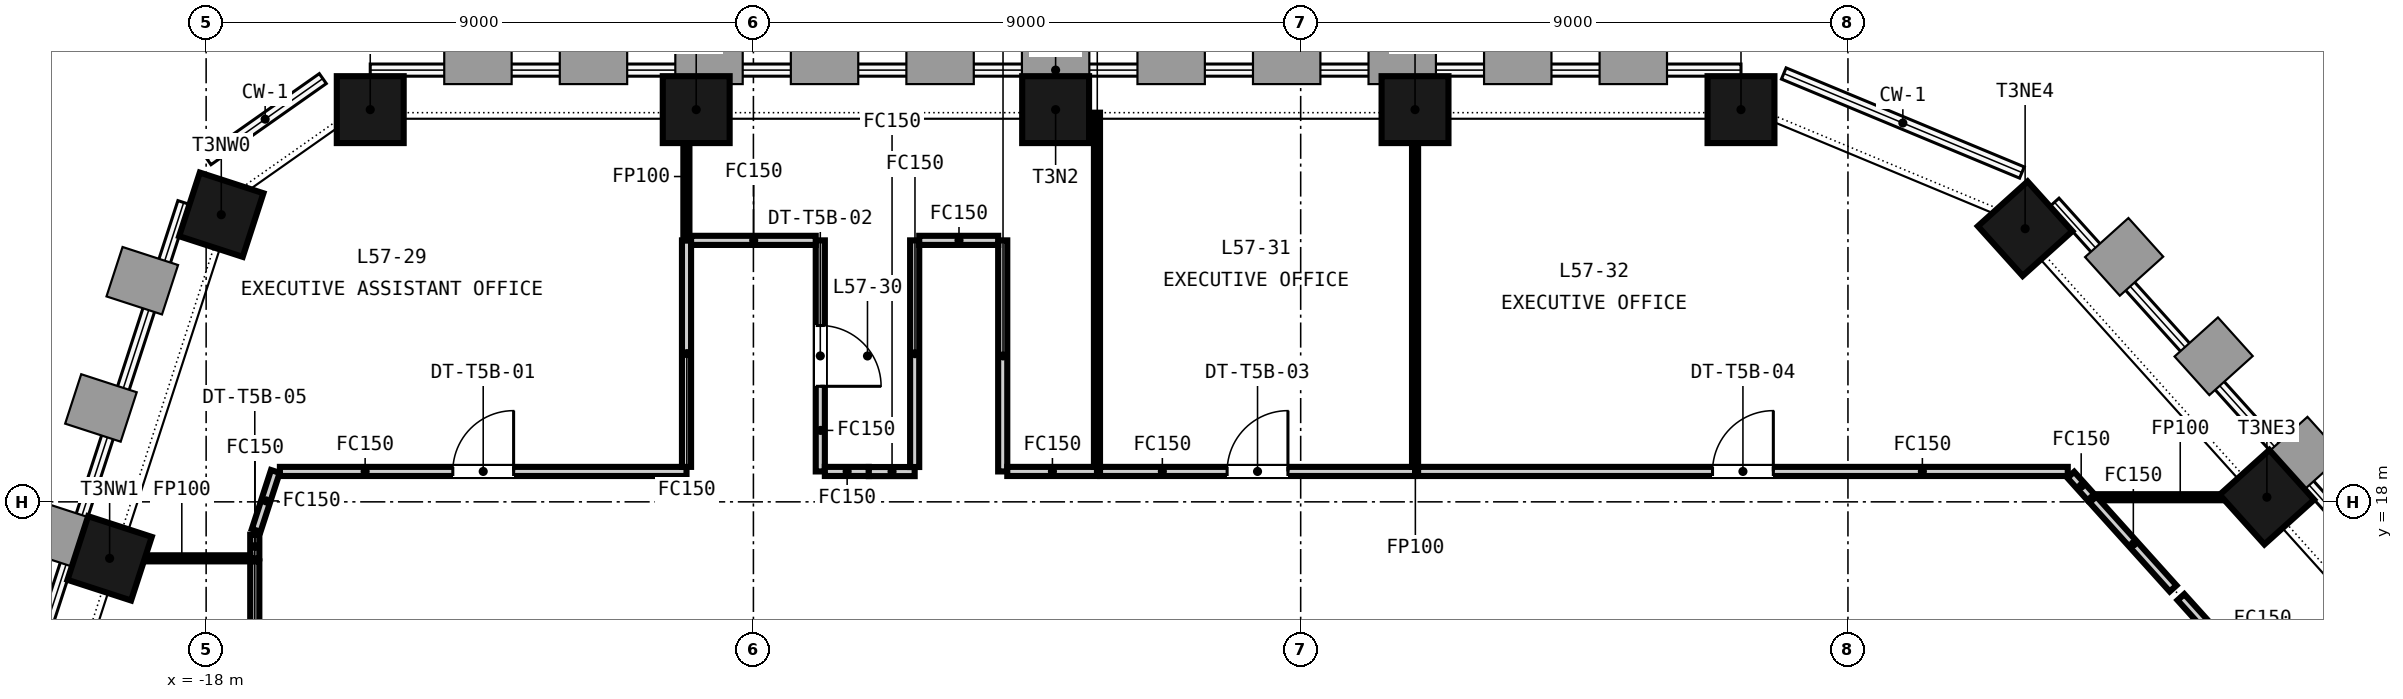
"""IFC4 building model, lengths in metres.
Left out: names, types, materials, properties, quantities, classifications, styles, units other than length and angle.
Written with IfcOpenShell. Run it as: python <this file> out.ifc"""

import sys

from ifc_helpers import new_model, si_unit, direction, frame, frame_2d, origin, origin_2d, place, context, subcontext, project, spatial, rectangle, extrude, element, fill, save


model = new_model("IFC4")
c1 = context("Model", 3, precision=1e-05, world=origin(), true_north=direction((0.0, 1.0)))
c2 = subcontext(c1, "Body", "Model", "MODEL_VIEW")
j1 = project(units=[si_unit("LENGTHUNIT", "METRE"), si_unit("PLANEANGLEUNIT", "RADIAN")], contexts=[c1])
p1 = place(None, origin())
s1 = spatial("IfcSite", under=j1, at=p1, CompositionType="ELEMENT")
p2 = place(p1, origin())
s2 = spatial("IfcBuilding", under=s1, at=p2, CompositionType="ELEMENT")
p3 = place(p2, frame((0.0, 0.0, 227.25)))
s3 = spatial("IfcBuildingStorey", under=s2, at=p3, CompositionType="ELEMENT", Elevation=227.25)
for number, where, z_axis, x_axis in (
    (1, (7.241, 24.45, -0.15), (0.0, 0.0, 1.0), (-1.0, 0.0, 0.0)),
    (2, (1.881, 24.45, -0.15), (0.0, 0.0, 1.0), (-1.0, 0.0, 0.0)),
    (3, (-4.03, 24.45, -0.15), (0.0, 0.0, 1.0), (-1.0, 0.0, 0.0)),
    (4, (-9.941, 24.45, -0.15), (0.0, 0.0, 1.0), (-1.0, 0.0, 0.0)),
    (5, (-15.301, 24.45, -0.15), (0.0, 0.0, 1.0), (-1.0, 0.0, 0.0)),
    (6, (-17.751, 22.722, -0.15), (0.0, 0.0, 1.0), (-0.309, -0.951, 0.0)),
    (7, (-19.587, 17.071, -0.15), (0.0, 0.0, 1.0), (-0.309, -0.951, 0.0)),
    (8, (15.89, 18.076, -0.15), (0.0, 0.0, 1.0), (-0.669, 0.743, 0.0)),
    (9, (11.914, 22.492, -0.15), (0.0, 0.0, 1.0), (-0.669, 0.743, 0.0)),
):
    element("IfcColumn", number, at=place(p3, frame(where, z_axis=z_axis, x_axis=x_axis)), inside=s3, PredefinedType="COLUMN", context=c2, shape_type="SweptSolid", body=[
        extrude(rectangle(XDim=1.1, YDim=1.1, at=origin_2d()), origin(), (0.0, 0.0, 1.0), 3.65),
    ])
p4 = place(p3, frame((-7.9, 22.3, 0.0), z_axis=(0.0, 0.0, 1.0), x_axis=(0.0, -1.0, 0.0)))
e10 = element("IfcWall", 10, at=p4, inside=s3, PredefinedType="PARTITIONING", context=c2, shape_type="SweptSolid", body=[
    extrude(rectangle(XDim=3.8, YDim=0.15, at=frame_2d((1.9, 0.0))), origin(), (0.0, 0.0, 1.0), 2.751),
])
p5 = place(p4, frame((1.4, 0.0, 0.0)))
e11 = element("IfcOpeningElement", 11, at=p5, cuts=e10, PredefinedType="OPENING", context=c2, shape_type="SweptSolid", body=[
    extrude(rectangle(XDim=1.0, YDim=2.1, at=frame_2d((0.5, 1.05))), frame((0.0, 0.085, 0.0), z_axis=(0.0, -1.0, 0.0), x_axis=(1.0, 0.0, 0.0)), (0.0, 0.0, 1.0), 0.17),
])
p6 = place(p3, frame((-4.9, 22.3, 0.0), z_axis=(0.0, 0.0, 1.0), x_axis=(0.0, -1.0, 0.0)))
e12 = element("IfcWall", 12, at=p6, inside=s3, PredefinedType="PARTITIONING", context=c2, shape_type="SweptSolid", body=[
    extrude(rectangle(XDim=3.8, YDim=0.15, at=frame_2d((1.9, 0.0))), origin(), (0.0, 0.0, 1.0), 2.751),
])
p7 = place(p3, frame((-17.2, 17.071, 0.0), z_axis=(0.0, 0.0, 1.0), x_axis=(0.0, 1.0, 0.0)))
e13 = element("IfcWall", 13, at=p7, inside=s3, PredefinedType="PARTITIONING", context=c2, shape_type="SweptSolid", body=[
    extrude(rectangle(XDim=0.389, YDim=0.15, at=frame_2d((0.194, 0.0))), origin(), (0.0, 0.0, 1.0), 2.751),
])
p8 = place(p3, frame((-17.177, 17.531, 0.0), z_axis=(0.0, 0.0, 1.0), x_axis=(0.30895599646, 0.951076333556, 0.0)))
e14 = element("IfcWall", 14, at=p8, inside=s3, PredefinedType="PARTITIONING", context=c2, shape_type="SweptSolid", body=[
    extrude(rectangle(XDim=1.019, YDim=0.15, at=frame_2d((0.509, 0.0))), origin(), (0.0, 0.0, 1.0), 2.751),
])
p9 = place(p3, frame((-16.787, 18.5, 0.0), z_axis=(0.0, 0.0, 1.0), x_axis=(1.0, 0.0, 0.0)))
e15 = element("IfcWall", 15, at=p9, inside=s3, PredefinedType="PARTITIONING", context=c2, shape_type="SweptSolid", body=[
    extrude(rectangle(XDim=6.687, YDim=0.15, at=frame_2d((3.344, 0.0))), origin(), (0.0, 0.0, 1.0), 2.751),
])
p10 = place(p9, frame((2.844, 0.0, 0.0)))
e16 = element("IfcOpeningElement", 16, at=p10, cuts=e15, PredefinedType="OPENING", context=c2, shape_type="SweptSolid", body=[
    extrude(rectangle(XDim=1.0, YDim=2.1, at=frame_2d((0.5, 1.05))), frame((0.0, 0.085, 0.0), z_axis=(0.0, -1.0, 0.0), x_axis=(1.0, 0.0, 0.0)), (0.0, 0.0, 1.0), 0.17),
])
p11 = place(p3, frame((-10.1, 18.575, 0.0), z_axis=(0.0, 0.0, 1.0), x_axis=(0.0, 1.0, 0.0)))
e17 = element("IfcWall", 17, at=p11, inside=s3, PredefinedType="PARTITIONING", context=c2, shape_type="SweptSolid", body=[
    extrude(rectangle(XDim=3.725, YDim=0.15, at=frame_2d((1.863, 0.0))), origin(), (0.0, 0.0, 1.0), 2.751),
])
p12 = place(p3, frame((-10.102, 22.3, 0.0), z_axis=(0.0, 0.0, 1.0), x_axis=(0.0, 1.0, 0.0)))
e18 = element("IfcWall", 18, at=p12, inside=s3, PredefinedType="PARTITIONING", context=c2, shape_type="SweptSolid", body=[
    extrude(rectangle(XDim=2.1, YDim=0.1, at=frame_2d((1.05, 0.0))), origin(), (0.0, 0.0, 1.0), 2.751),
])
p13 = place(p3, frame((-19.535, 17.071, 0.0), z_axis=(0.0, 0.0, 1.0), x_axis=(1.0, 0.0, 0.0)))
e19 = element("IfcWall", 19, at=p13, inside=s3, PredefinedType="PARTITIONING", context=c2, shape_type="SweptSolid", body=[
    extrude(rectangle(XDim=2.26, YDim=0.1, at=frame_2d((1.13, 0.0))), origin(), (0.0, 0.0, 1.0), 2.751),
])
p14 = place(p3, frame((-10.025, 22.3, 0.0), z_axis=(0.0, 0.0, 1.0), x_axis=(1.0, 0.0, 0.0)))
e20 = element("IfcWall", 20, at=p14, inside=s3, PredefinedType="PARTITIONING", context=c2, shape_type="SweptSolid", body=[
    extrude(rectangle(XDim=2.05, YDim=0.15, at=frame_2d((1.025, 0.0))), origin(), (0.0, 0.0, 1.0), 2.751),
])
p15 = place(p3, frame((-7.825, 18.5, 0.0), z_axis=(0.0, 0.0, 1.0), x_axis=(1.0, 0.0, 0.0)))
e21 = element("IfcWall", 21, at=p15, inside=s3, PredefinedType="PARTITIONING", context=c2, shape_type="SweptSolid", body=[
    extrude(rectangle(XDim=0.723, YDim=0.15, at=frame_2d((0.361, 0.0))), origin(), (0.0, 0.0, 1.0), 2.751),
])
p16 = place(p3, frame((-7.102, 18.498, 0.0), z_axis=(0.0, 0.0, 1.0), x_axis=(1.0, 0.0, 0.0)))
e22 = element("IfcWall", 22, at=p16, inside=s3, PredefinedType="PARTITIONING", context=c2, shape_type="SweptSolid", body=[
    extrude(rectangle(XDim=0.754, YDim=0.15, at=frame_2d((0.377, 0.0))), origin(), (0.0, 0.0, 1.0), 2.751),
])
p17 = place(p3, frame((-6.348, 18.573, 0.0), z_axis=(0.0, 0.0, 1.0), x_axis=(0.0, 1.0, 0.0)))
e23 = element("IfcWall", 23, at=p17, inside=s3, PredefinedType="PARTITIONING", context=c2, shape_type="SweptSolid", body=[
    extrude(rectangle(XDim=3.727, YDim=0.15, at=frame_2d((1.864, 0.0))), origin(), (0.0, 0.0, 1.0), 2.751),
])
p18 = place(p3, frame((-6.273, 22.3, 0.0), z_axis=(0.0, 0.0, 1.0), x_axis=(1.0, 0.0, 0.0)))
e24 = element("IfcWall", 24, at=p18, inside=s3, PredefinedType="PARTITIONING", context=c2, shape_type="SweptSolid", body=[
    extrude(rectangle(XDim=1.298, YDim=0.15, at=frame_2d((0.649, 0.0))), origin(), (0.0, 0.0, 1.0), 2.751),
])
p19 = place(p3, frame((-4.825, 18.5, 0.0), z_axis=(0.0, 0.0, 1.0), x_axis=(1.0, 0.0, 0.0)))
e25 = element("IfcWall", 25, at=p19, inside=s3, PredefinedType="PARTITIONING", context=c2, shape_type="SweptSolid", body=[
    extrude(rectangle(XDim=1.475, YDim=0.15, at=frame_2d((0.737, 0.0))), origin(), (0.0, 0.0, 1.0), 2.751),
])
p20 = place(p3, frame((-3.35, 18.575, 0.0), z_axis=(0.0, 0.0, 1.0), x_axis=(0.0, 1.0, 0.0)))
e26 = element("IfcWall", 26, at=p20, inside=s3, PredefinedType="PARTITIONING", context=c2, shape_type="SweptSolid", body=[
    extrude(rectangle(XDim=5.825, YDim=0.1, at=frame_2d((2.913, 0.0))), origin(), (0.0, 0.0, 1.0), 2.751),
])
p21 = place(p3, frame((-3.3, 18.5, 0.0), z_axis=(0.0, 0.0, 1.0), x_axis=(1.0, 0.0, 0.0)))
e27 = element("IfcWall", 27, at=p21, inside=s3, PredefinedType="PARTITIONING", context=c2, shape_type="SweptSolid", body=[
    extrude(rectangle(XDim=5.181, YDim=0.15, at=frame_2d((2.591, 0.0))), origin(), (0.0, 0.0, 1.0), 2.751),
])
p22 = place(p21, frame((2.091, 0.0, 0.0)))
e28 = element("IfcOpeningElement", 28, at=p22, cuts=e27, PredefinedType="OPENING", context=c2, shape_type="SweptSolid", body=[
    extrude(rectangle(XDim=1.0, YDim=2.1, at=frame_2d((0.5, 1.05))), frame((0.0, 0.085, 0.0), z_axis=(0.0, -1.0, 0.0), x_axis=(1.0, 0.0, 0.0)), (0.0, 0.0, 1.0), 0.17),
])
p23 = place(p3, frame((1.881, 18.575, 0.0), z_axis=(0.0, 0.0, 1.0), x_axis=(0.0, 1.0, 0.0)))
e29 = element("IfcWall", 29, at=p23, inside=s3, PredefinedType="PARTITIONING", context=c2, shape_type="SweptSolid", body=[
    extrude(rectangle(XDim=5.825, YDim=0.1, at=frame_2d((2.913, 0.0))), origin(), (0.0, 0.0, 1.0), 2.751),
])
p24 = place(p3, frame((1.931, 18.5, 0.0), z_axis=(0.0, 0.0, 1.0), x_axis=(1.0, 0.0, 0.0)))
e30 = element("IfcWall", 30, at=p24, inside=s3, PredefinedType="PARTITIONING", context=c2, shape_type="SweptSolid", body=[
    extrude(rectangle(XDim=10.684, YDim=0.15, at=frame_2d((5.342, 0.0))), origin(), (0.0, 0.0, 1.0), 2.751),
])
p25 = place(p24, frame((4.842, 0.0, 0.0)))
e31 = element("IfcOpeningElement", 31, at=p25, cuts=e30, PredefinedType="OPENING", context=c2, shape_type="SweptSolid", body=[
    extrude(rectangle(XDim=1.0, YDim=2.1, at=frame_2d((0.5, 1.05))), frame((0.0, 0.085, 0.0), z_axis=(0.0, -1.0, 0.0), x_axis=(1.0, 0.0, 0.0)), (0.0, 0.0, 1.0), 0.17),
])
p26 = place(p3, frame((12.665, 18.444, 0.0), z_axis=(0.0, 0.0, 1.0), x_axis=(0.668637752652, -0.743588297197, 0.0)))
e32 = element("IfcWall", 32, at=p26, inside=s3, PredefinedType="PARTITIONING", context=c2, shape_type="SweptSolid", body=[
    extrude(rectangle(XDim=0.495, YDim=0.15, at=frame_2d((0.248, 0.0))), origin(), (0.0, 0.0, 1.0), 2.751),
])
p27 = place(p3, frame((13.097, 18.076, 0.0), z_axis=(0.0, 0.0, 1.0), x_axis=(1.0, 0.0, 0.0)))
e33 = element("IfcWall", 33, at=p27, inside=s3, PredefinedType="PARTITIONING", context=c2, shape_type="SweptSolid", body=[
    extrude(rectangle(XDim=2.725, YDim=0.1, at=frame_2d((1.363, 0.0))), origin(), (0.0, 0.0, 1.0), 2.751),
])
p28 = place(p3, frame((-17.2, 10.897, 0.0), z_axis=(0.0, 0.0, 1.0), x_axis=(0.0, 1.0, 0.0)))
e34 = element("IfcWall", 34, at=p28, inside=s3, PredefinedType="PARTITIONING", context=c2, shape_type="SweptSolid", body=[
    extrude(rectangle(XDim=6.124, YDim=0.15, at=frame_2d((3.062, 0.0))), origin(), (0.0, 0.0, 1.0), 2.751),
])
p29 = place(p28, frame((2.562, 0.0, 0.0)))
e35 = element("IfcOpeningElement", 35, at=p29, cuts=e34, PredefinedType="OPENING", context=c2, shape_type="SweptSolid", body=[
    extrude(rectangle(XDim=1.0, YDim=2.1, at=frame_2d((0.5, 1.05))), frame((0.0, 0.085, 0.0), z_axis=(0.0, -1.0, 0.0), x_axis=(1.0, 0.0, 0.0)), (0.0, 0.0, 1.0), 0.17),
])
p30 = place(p3, frame((13.03, 18.039, 0.0), z_axis=(0.0, 0.0, 1.0), x_axis=(0.669183955235, -0.743096786466, 0.0)))
e36 = element("IfcWall", 36, at=p30, inside=s3, PredefinedType="PARTITIONING", context=c2, shape_type="SweptSolid", body=[
    extrude(rectangle(XDim=1.969, YDim=0.15, at=frame_2d((0.984, 0.0))), origin(), (0.0, 0.0, 1.0), 2.751),
])
p31 = place(p3, frame((14.476, 16.433, 0.0), z_axis=(0.0, 0.0, 1.0), x_axis=(0.669204384193, -0.743078388985, 0.0)))
e37 = element("IfcWall", 37, at=p31, inside=s3, PredefinedType="PARTITIONING", context=c2, shape_type="SweptSolid", body=[
    extrude(rectangle(XDim=3.996, YDim=0.15, at=frame_2d((1.998, 0.0))), origin(), (0.0, 0.0, 1.0), 2.751),
])
p32 = place(p10, origin())
e38 = element("IfcDoor", 38, at=p32, inside=s3, OperationType="SINGLE_SWING_RIGHT", PredefinedType="DOOR", context=c2, shape_type="SweptSolid", body=[
    extrude(rectangle(XDim=1.0, YDim=2.1, at=frame_2d((0.5, 1.05))), frame((0.0, 0.025, 0.0), z_axis=(0.0, -1.0, 0.0), x_axis=(1.0, 0.0, 0.0)), (0.0, 0.0, 1.0), 0.05),
])
fill(e16, e38)
p33 = place(p5, origin())
e39 = element("IfcDoor", 39, at=p33, inside=s3, OperationType="SINGLE_SWING_RIGHT", PredefinedType="DOOR", context=c2, shape_type="SweptSolid", body=[
    extrude(rectangle(XDim=1.0, YDim=2.1, at=frame_2d((0.5, 1.05))), frame((0.0, 0.025, 0.0), z_axis=(0.0, -1.0, 0.0), x_axis=(1.0, 0.0, 0.0)), (0.0, 0.0, 1.0), 0.05),
])
fill(e11, e39)
p34 = place(p22, origin())
e40 = element("IfcDoor", 40, at=p34, inside=s3, OperationType="SINGLE_SWING_RIGHT", PredefinedType="DOOR", context=c2, shape_type="SweptSolid", body=[
    extrude(rectangle(XDim=1.0, YDim=2.1, at=frame_2d((0.5, 1.05))), frame((0.0, 0.025, 0.0), z_axis=(0.0, -1.0, 0.0), x_axis=(1.0, 0.0, 0.0)), (0.0, 0.0, 1.0), 0.05),
])
fill(e28, e40)
p35 = place(p25, origin())
e41 = element("IfcDoor", 41, at=p35, inside=s3, OperationType="SINGLE_SWING_RIGHT", PredefinedType="DOOR", context=c2, shape_type="SweptSolid", body=[
    extrude(rectangle(XDim=1.0, YDim=2.1, at=frame_2d((0.5, 1.05))), frame((0.0, 0.025, 0.0), z_axis=(0.0, -1.0, 0.0), x_axis=(1.0, 0.0, 0.0)), (0.0, 0.0, 1.0), 0.05),
])
fill(e31, e41)
save(model, sys.argv[1])
